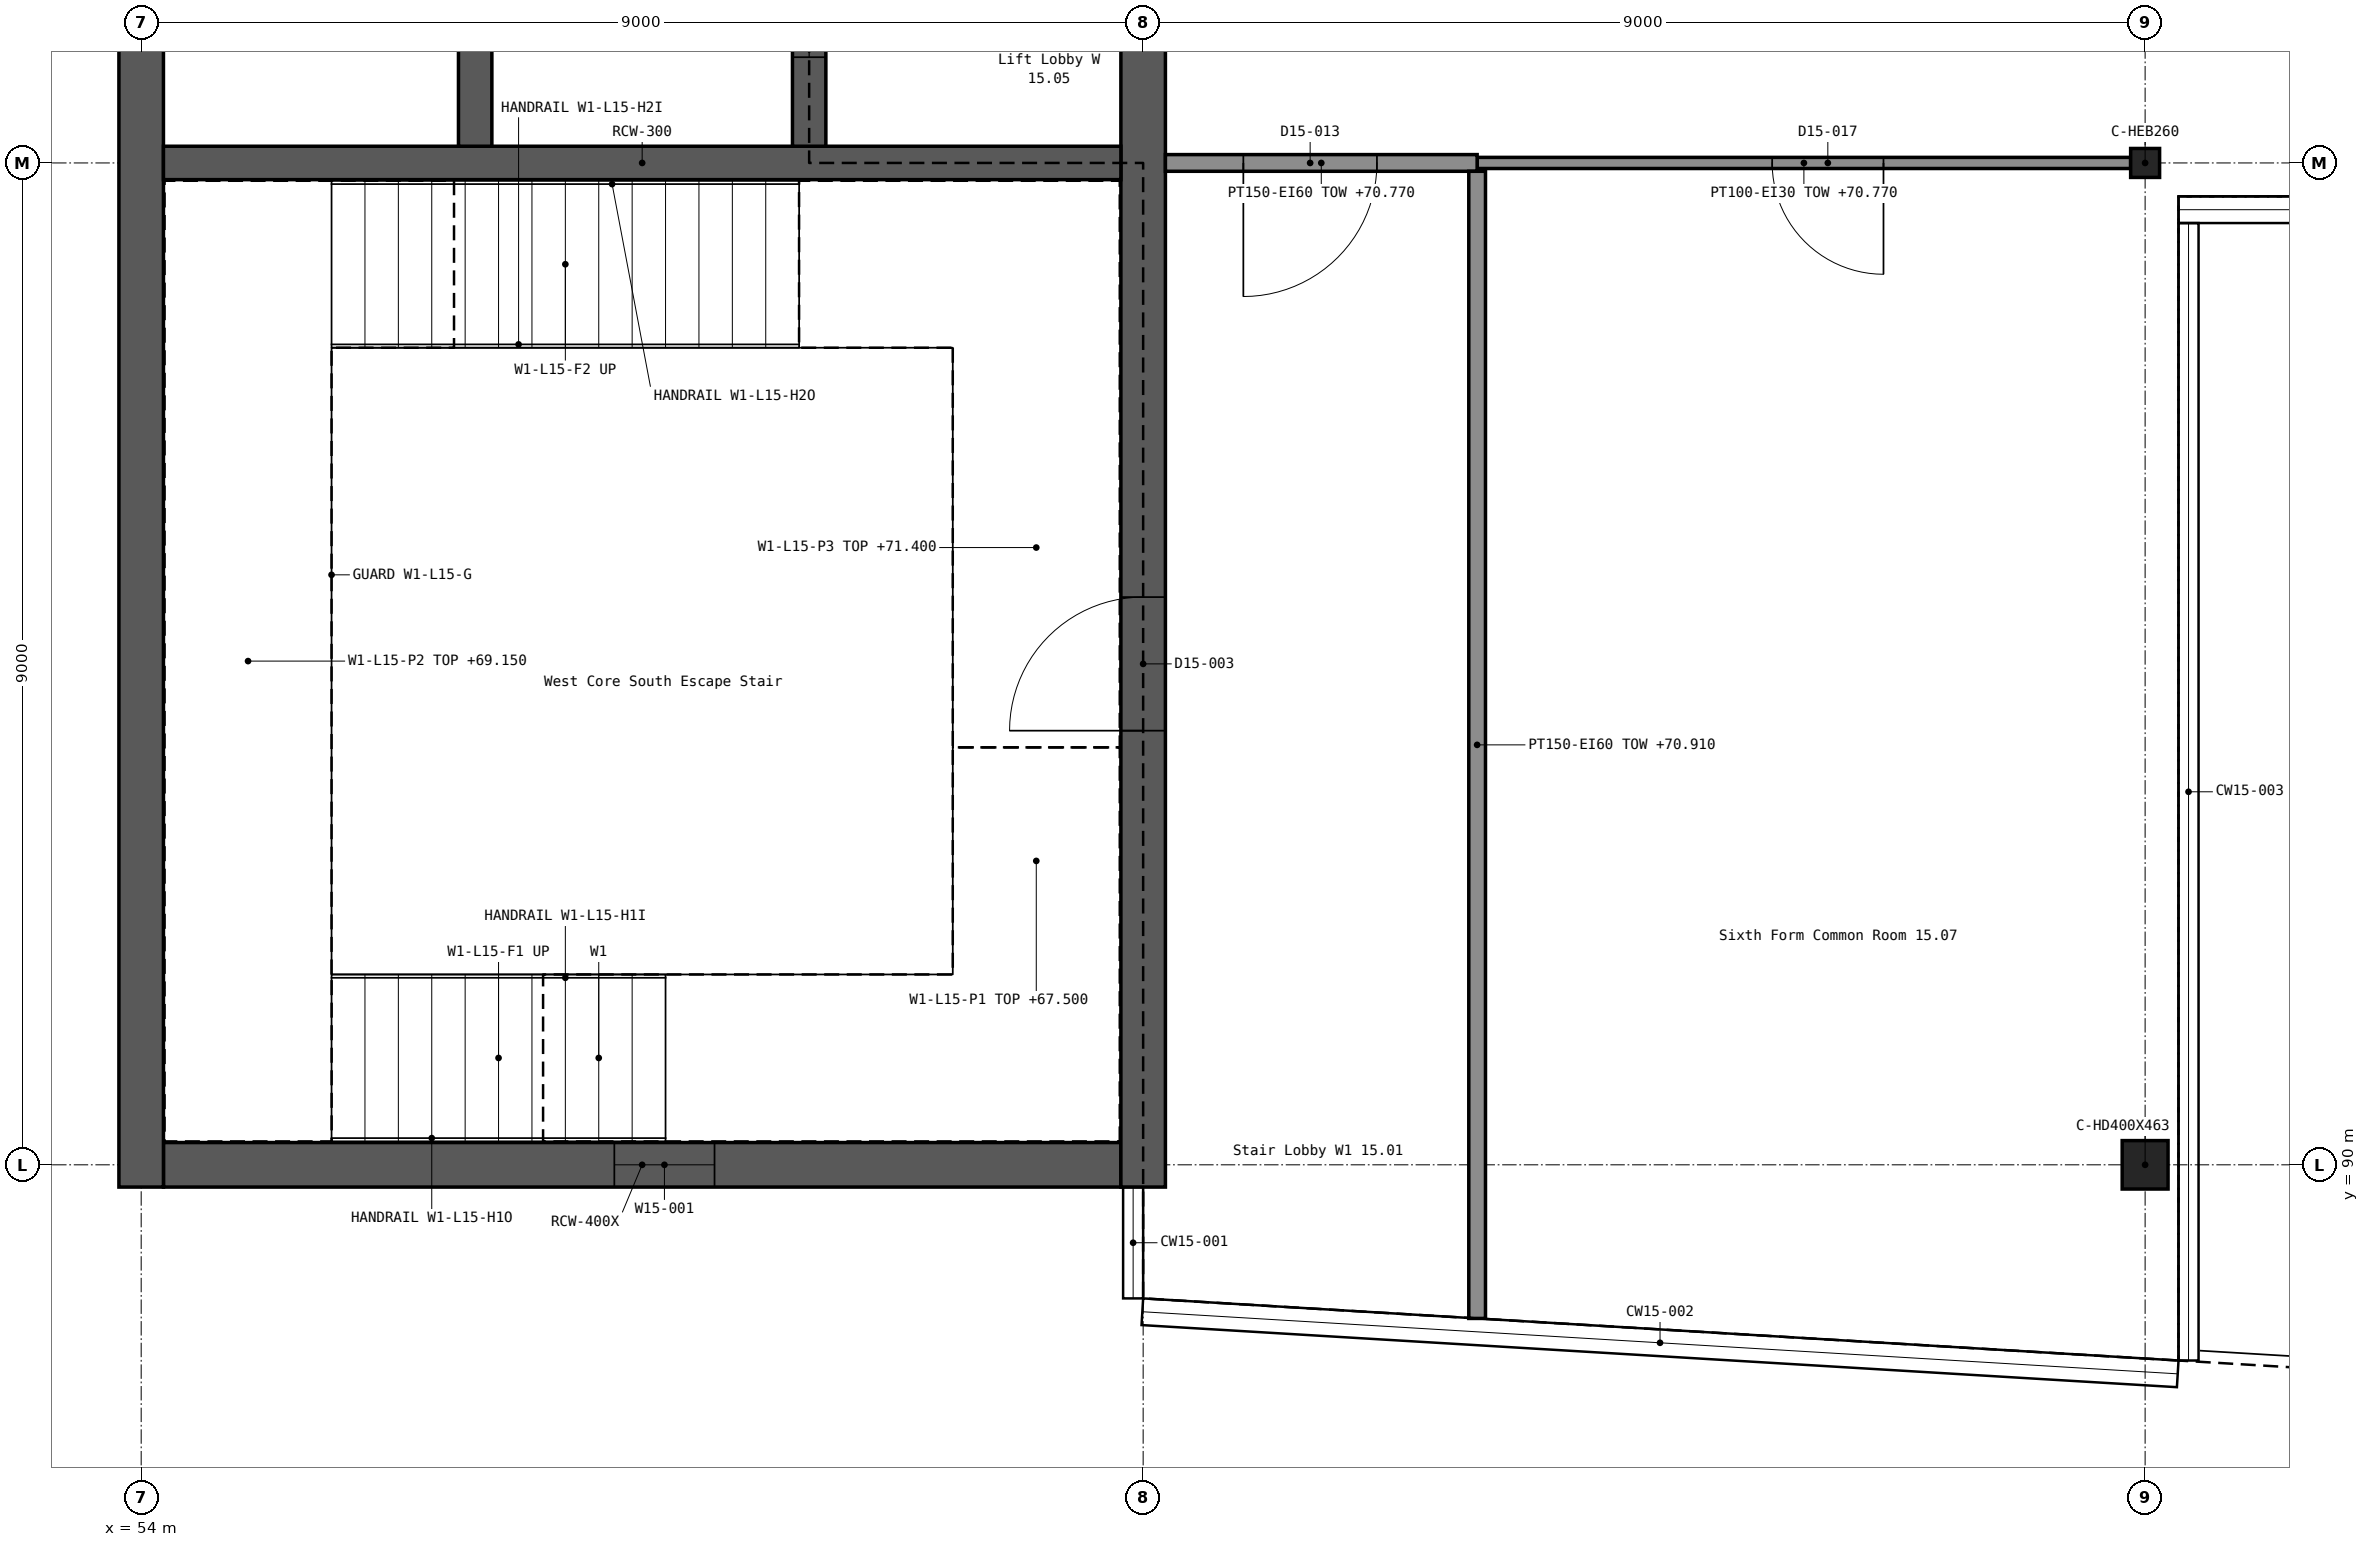
"""IFC4 building model, lengths in metres.
Left out: names, types, materials, properties, quantities, classifications, styles, units other than length and angle.
Written with IfcOpenShell. Run it as: python <this file> out.ifc"""

import sys

from ifc_helpers import new_model, si_unit, direction, frame, frame_2d, origin, origin_2d, place, context, subcontext, project, spatial, rectangle, i_section, extrude, element, fill, save


model = new_model("IFC4")
c1 = context("Model", 3, precision=1e-05, world=origin(), true_north=direction((0.0, 1.0)))
c2 = subcontext(c1, "Body", "Model", "MODEL_VIEW")
j1 = project(units=[si_unit("LENGTHUNIT", "METRE"), si_unit("PLANEANGLEUNIT", "RADIAN")], contexts=[c1])
p1 = place(None, origin())
s1 = spatial("IfcSite", under=j1, at=p1, CompositionType="ELEMENT")
p2 = place(p1, origin())
s2 = spatial("IfcBuilding", under=s1, at=p2, CompositionType="ELEMENT")
p3 = place(p2, frame((0.0, 0.0, 67.5)))
s3 = spatial("IfcBuildingStorey", under=s2, at=p3, CompositionType="ELEMENT", Elevation=67.5)
p4 = place(p3, frame((54.2, 90.0, 0.0), z_axis=(0.0, 0.0, 1.0), x_axis=(1.0, 0.0, 0.0)))
e1 = element("IfcWall", 1, at=p4, inside=s3, PredefinedType="SHEAR", context=c2, shape_type="SweptSolid", body=[
    extrude(rectangle(XDim=8.6, YDim=0.4, at=frame_2d((4.3, 0.0))), origin(), (0.0, 0.0, 1.0), 3.9),
])
p5 = place(p4, frame((4.05, 0.0, 1.2)))
e2 = element("IfcOpeningElement", 2, at=p5, cuts=e1, PredefinedType="OPENING", context=c2, shape_type="SweptSolid", body=[
    extrude(rectangle(XDim=0.9, YDim=1.5, at=frame_2d((0.45, 0.75))), frame((0.0, 0.211, 0.0), z_axis=(0.0, -1.0, 0.0), x_axis=(1.0, 0.0, 0.0)), (0.0, 0.0, 1.0), 0.422),
])
p6 = place(p3, frame((54.0, 89.8, 0.0), z_axis=(0.0, 0.0, 1.0), x_axis=(0.0, 1.0, 0.0)))
e3 = element("IfcWall", 3, at=p6, inside=s3, PredefinedType="SHEAR", context=c2, shape_type="SweptSolid", body=[
    extrude(rectangle(XDim=27.4, YDim=0.4, at=frame_2d((13.7, 0.0))), origin(), (0.0, 0.0, 1.0), 3.9),
])
p7 = place(p3, frame((63.0, 89.8, 0.0), z_axis=(0.0, 0.0, 1.0), x_axis=(0.0, 1.0, 0.0)))
e4 = element("IfcWall", 4, at=p7, inside=s3, PredefinedType="SHEAR", context=c2, shape_type="SweptSolid", body=[
    extrude(rectangle(XDim=27.4, YDim=0.4, at=frame_2d((13.7, 0.0))), origin(), (0.0, 0.0, 1.0), 3.9),
])
p8 = place(p7, frame((4.1, 0.0, 0.0)))
e5 = element("IfcOpeningElement", 5, at=p8, cuts=e4, PredefinedType="OPENING", context=c2, shape_type="SweptSolid", body=[
    extrude(rectangle(XDim=1.2, YDim=2.1, at=frame_2d((0.6, 1.05))), frame((0.0, 0.211, 0.0), z_axis=(0.0, -1.0, 0.0), x_axis=(1.0, 0.0, 0.0)), (0.0, 0.0, 1.0), 0.422),
])
p9 = place(p7, frame((22.1, 0.0, 0.0)))
e6 = element("IfcOpeningElement", 6, at=p9, cuts=e4, PredefinedType="OPENING", context=c2, shape_type="SweptSolid", body=[
    extrude(rectangle(XDim=1.2, YDim=2.1, at=frame_2d((0.6, 1.05))), frame((0.0, 0.211, 0.0), z_axis=(0.0, -1.0, 0.0), x_axis=(1.0, 0.0, 0.0)), (0.0, 0.0, 1.0), 0.422),
])
p10 = place(p7, frame((12.5, 0.0, 0.0)))
e7 = element("IfcOpeningElement", 7, at=p10, cuts=e4, PredefinedType="OPENING", context=c2, shape_type="SweptSolid", body=[
    extrude(rectangle(XDim=2.0, YDim=2.1, at=frame_2d((1.0, 1.05))), frame((0.0, 0.211, 0.0), z_axis=(0.0, -1.0, 0.0), x_axis=(1.0, 0.0, 0.0)), (0.0, 0.0, 1.0), 0.422),
])
p11 = place(p3, frame((54.2, 99.0, 0.0), z_axis=(0.0, 0.0, 1.0), x_axis=(1.0, 0.0, 0.0)))
e8 = element("IfcWall", 8, at=p11, inside=s3, PredefinedType="SHEAR", context=c2, shape_type="SweptSolid", body=[
    extrude(rectangle(XDim=8.6, YDim=0.3, at=frame_2d((4.3, 0.0))), origin(), (0.0, 0.0, 1.0), 3.9),
])
p12 = place(p3, frame((57.0, 99.15, 0.0), z_axis=(0.0, 0.0, 1.0), x_axis=(0.0, 1.0, 0.0)))
e9 = element("IfcWall", 9, at=p12, inside=s3, PredefinedType="SHEAR", context=c2, shape_type="SweptSolid", body=[
    extrude(rectangle(XDim=8.7, YDim=0.3, at=frame_2d((4.35, 0.0))), origin(), (0.0, 0.0, 1.0), 3.9),
])
p13 = place(p3, frame((60.0, 99.15, 0.0), z_axis=(0.0, 0.0, 1.0), x_axis=(0.0, 1.0, 0.0)))
e10 = element("IfcWall", 10, at=p13, inside=s3, PredefinedType="SHEAR", context=c2, shape_type="SweptSolid", body=[
    extrude(rectangle(XDim=8.7, YDim=0.3, at=frame_2d((4.35, 0.0))), origin(), (0.0, 0.0, 1.0), 3.9),
])
p14 = place(p13, frame((0.8, 0.0, 0.0)))
e11 = element("IfcOpeningElement", 11, at=p14, cuts=e10, PredefinedType="OPENING", context=c2, shape_type="SweptSolid", body=[
    extrude(rectangle(XDim=1.1, YDim=2.1, at=frame_2d((0.55, 1.05))), frame((0.0, 0.161, 0.0), z_axis=(0.0, -1.0, 0.0), x_axis=(1.0, 0.0, 0.0)), (0.0, 0.0, 1.0), 0.322),
])
p15 = place(p13, frame((3.8, 0.0, 0.0)))
e12 = element("IfcOpeningElement", 12, at=p15, cuts=e10, PredefinedType="OPENING", context=c2, shape_type="SweptSolid", body=[
    extrude(rectangle(XDim=1.1, YDim=2.1, at=frame_2d((0.55, 1.05))), frame((0.0, 0.161, 0.0), z_axis=(0.0, -1.0, 0.0), x_axis=(1.0, 0.0, 0.0)), (0.0, 0.0, 1.0), 0.322),
])
p16 = place(p13, frame((6.8, 0.0, 0.0)))
e13 = element("IfcOpeningElement", 13, at=p16, cuts=e10, PredefinedType="OPENING", context=c2, shape_type="SweptSolid", body=[
    extrude(rectangle(XDim=1.1, YDim=2.1, at=frame_2d((0.55, 1.05))), frame((0.0, 0.161, 0.0), z_axis=(0.0, -1.0, 0.0), x_axis=(1.0, 0.0, 0.0)), (0.0, 0.0, 1.0), 0.322),
])
p17 = place(p3, frame((72.0, 90.0, 0.0), z_axis=(0.0, 0.0, 1.0), x_axis=(1.0, 0.0, 0.0)))
e14 = element("IfcColumn", 14, at=p17, inside=s3, PredefinedType="COLUMN", context=c2, shape_type="SweptSolid", body=[
    extrude(i_section(OverallWidth=0.412, OverallDepth=0.435, WebThickness=0.036, FlangeThickness=0.057, FilletRadius=0.015, at=origin_2d()), origin(), (0.0, 0.0, 1.0), 3.9),
])
p18 = place(p3, frame((72.0, 99.0, 0.0), z_axis=(0.0, 0.0, 1.0), x_axis=(1.0, 0.0, 0.0)))
e15 = element("IfcColumn", 15, at=p18, inside=s3, PredefinedType="COLUMN", context=c2, shape_type="SweptSolid", body=[
    extrude(i_section(OverallWidth=0.26, OverallDepth=0.26, WebThickness=0.01, FlangeThickness=0.018, FilletRadius=0.024, at=origin_2d()), origin(), (0.0, 0.0, 1.0), 3.9),
])
p19 = place(p3, frame((66.0, 99.0, 0.0), z_axis=(0.0, 0.0, 1.0), x_axis=(1.0, 0.0, 0.0)))
e16 = element("IfcWall", 16, at=p19, inside=s3, PredefinedType="PARTITIONING", context=c2, shape_type="SweptSolid", body=[
    extrude(rectangle(XDim=5.87, YDim=0.1, at=frame_2d((2.935, 0.0))), origin(), (0.0, 0.0, 1.0), 3.27),
])
p20 = place(p19, frame((2.65, 0.0, 0.0)))
e17 = element("IfcOpeningElement", 17, at=p20, cuts=e16, PredefinedType="OPENING", context=c2, shape_type="SweptSolid", body=[
    extrude(rectangle(XDim=1.0, YDim=2.1, at=frame_2d((0.5, 1.05))), frame((0.0, 0.061, 0.0), z_axis=(0.0, -1.0, 0.0), x_axis=(1.0, 0.0, 0.0)), (0.0, 0.0, 1.0), 0.122),
])
p21 = place(p3, frame((63.2, 99.0, 0.0), z_axis=(0.0, 0.0, 1.0), x_axis=(1.0, 0.0, 0.0)))
e18 = element("IfcWall", 18, at=p21, inside=s3, PredefinedType="PARTITIONING", context=c2, shape_type="SweptSolid", body=[
    extrude(rectangle(XDim=2.8, YDim=0.15, at=frame_2d((1.4, 0.0))), origin(), (0.0, 0.0, 1.0), 3.27),
])
p22 = place(p21, frame((0.7, 0.0, 0.0)))
e19 = element("IfcOpeningElement", 19, at=p22, cuts=e18, PredefinedType="OPENING", context=c2, shape_type="SweptSolid", body=[
    extrude(rectangle(XDim=1.2, YDim=2.1, at=frame_2d((0.6, 1.05))), frame((0.0, 0.086, 0.0), z_axis=(0.0, -1.0, 0.0), x_axis=(1.0, 0.0, 0.0)), (0.0, 0.0, 1.0), 0.172),
])
p23 = place(p3, frame((66.0, 88.62, 0.0), z_axis=(0.0, 0.0, 1.0), x_axis=(0.0, 1.0, 0.0)))
e20 = element("IfcWall", 20, at=p23, inside=s3, PredefinedType="PARTITIONING", context=c2, shape_type="SweptSolid", body=[
    extrude(rectangle(XDim=10.305, YDim=0.15, at=frame_2d((5.152, 0.0))), origin(), (0.0, 0.0, 1.0), 3.41),
])
p24 = place(p5, origin())
e21 = element("IfcWindow", 21, at=p24, inside=s3, PartitioningType="SINGLE_PANEL", PredefinedType="WINDOW", context=c2, shape_type="SweptSolid", body=[
    extrude(rectangle(XDim=0.9, YDim=1.5, at=frame_2d((0.45, 0.75))), frame((0.0, 0.03, 0.0), z_axis=(0.0, -1.0, 0.0), x_axis=(1.0, 0.0, 0.0)), (0.0, 0.0, 1.0), 0.06),
])
fill(e2, e21)
p25 = place(p8, origin())
e22 = element("IfcDoor", 22, at=p25, inside=s3, OperationType="SINGLE_SWING_LEFT", PredefinedType="DOOR", context=c2, shape_type="SweptSolid", body=[
    extrude(rectangle(XDim=1.2, YDim=2.1, at=frame_2d((0.6, 1.05))), frame((0.0, 0.025, 0.0), z_axis=(0.0, -1.0, 0.0), x_axis=(1.0, 0.0, 0.0)), (0.0, 0.0, 1.0), 0.05),
])
fill(e5, e22)
p26 = place(p14, origin())
e23 = element("IfcDoor", 23, at=p26, inside=s3, OperationType="DOUBLE_DOOR_SLIDING", PredefinedType="DOOR", context=c2, shape_type="SweptSolid", body=[
    extrude(rectangle(XDim=1.1, YDim=2.1, at=frame_2d((0.55, 1.05))), frame((0.0, 0.025, 0.0), z_axis=(0.0, -1.0, 0.0), x_axis=(1.0, 0.0, 0.0)), (0.0, 0.0, 1.0), 0.05),
])
fill(e11, e23)
p27 = place(p22, frame((1.2, 0.0, 0.0), z_axis=(0.0, 0.0, 1.0), x_axis=(-1.0, 0.0, 0.0)))
e24 = element("IfcDoor", 24, at=p27, inside=s3, OperationType="SINGLE_SWING_RIGHT", PredefinedType="DOOR", context=c2, shape_type="SweptSolid", body=[
    extrude(rectangle(XDim=1.2, YDim=2.1, at=frame_2d((0.6, 1.05))), frame((0.0, 0.025, 0.0), z_axis=(0.0, -1.0, 0.0), x_axis=(1.0, 0.0, 0.0)), (0.0, 0.0, 1.0), 0.05),
])
fill(e19, e24)
p28 = place(p20, frame((1.0, 0.0, 0.0), z_axis=(0.0, 0.0, 1.0), x_axis=(-1.0, 0.0, 0.0)))
e25 = element("IfcDoor", 25, at=p28, inside=s3, OperationType="SINGLE_SWING_LEFT", PredefinedType="DOOR", context=c2, shape_type="SweptSolid", body=[
    extrude(rectangle(XDim=1.0, YDim=2.1, at=frame_2d((0.5, 1.05))), frame((0.0, 0.025, 0.0), z_axis=(0.0, -1.0, 0.0), x_axis=(1.0, 0.0, 0.0)), (0.0, 0.0, 1.0), 0.05),
])
fill(e17, e25)
save(model, sys.argv[1])
